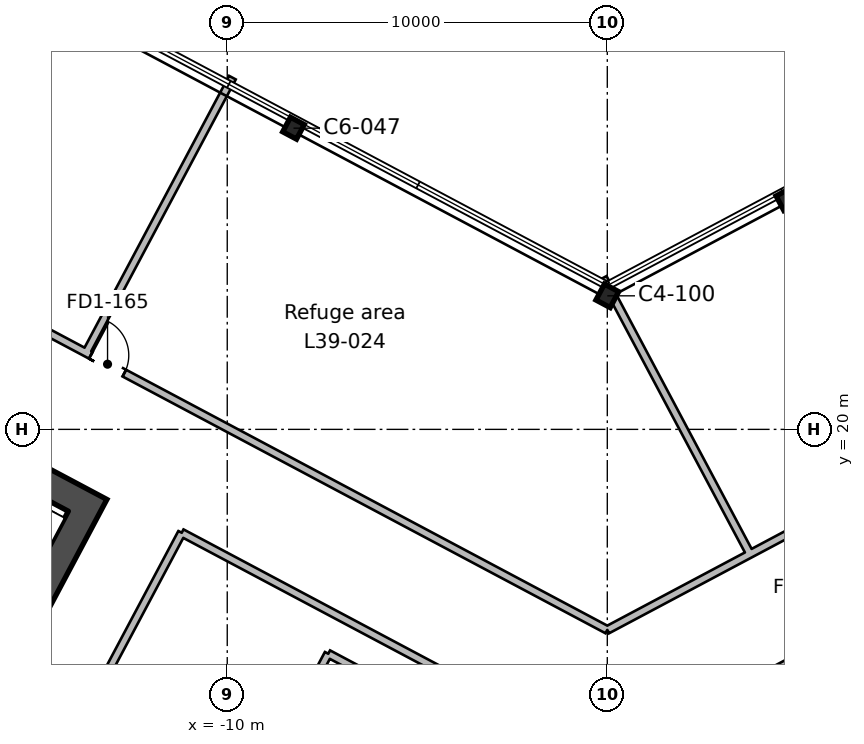
"""IFC4 building model, lengths in metres.
Left out: names, types, materials, properties, quantities, classifications, styles, units other than length and angle.
Written with IfcOpenShell. Run it as: python <this file> out.ifc"""

import sys

from ifc_helpers import new_model, si_unit, direction, frame, frame_2d, origin, origin_2d, place, context, subcontext, project, spatial, rectangle, i_section, extrude, element, fill, save


model = new_model("IFC4")
c1 = context("Model", 3, precision=1e-05, world=origin(), true_north=direction((0.0, 1.0)))
c2 = subcontext(c1, "Body", "Model", "MODEL_VIEW")
j1 = project(units=[si_unit("LENGTHUNIT", "METRE"), si_unit("PLANEANGLEUNIT", "RADIAN")], contexts=[c1])
p1 = place(None, origin())
s1 = spatial("IfcSite", under=j1, at=p1, CompositionType="ELEMENT")
p2 = place(p1, origin())
s2 = spatial("IfcBuilding", under=s1, at=p2, CompositionType="ELEMENT")
p3 = place(p2, frame((0.0, 0.0, 183.6)))
s3 = spatial("IfcBuildingStorey", under=s2, at=p3, CompositionType="ELEMENT", Elevation=183.6)
p4 = place(p3, frame((0.0, 23.514, 0.0), z_axis=(0.0, 0.0, 1.0), x_axis=(-0.882947592859, 0.469471562786, 0.0)))
e1 = element("IfcColumn", 1, at=p4, inside=s3, PredefinedType="COLUMN", context=c2, shape_type="SweptSolid", body=[
    extrude(i_section(OverallWidth=0.424, OverallDepth=0.475, WebThickness=0.048, FlangeThickness=0.077, FilletRadius=0.015, at=origin_2d()), origin(), (0.0, 0.0, 1.0), 6.0),
])
for number, where, z_axis, x_axis in (
    (2, (4.725, 26.047, 0.0), (0.0, 0.0, 1.0), (-0.883, -0.469, 0.0)),
    (3, (-8.257, 27.925, 0.0), (0.0, 0.0, 1.0), (-0.883, 0.469, 0.0)),
):
    element("IfcColumn", number, at=place(p3, frame(where, z_axis=z_axis, x_axis=x_axis)), inside=s3, PredefinedType="COLUMN", context=c2, shape_type="SweptSolid", body=[
        extrude(i_section(OverallWidth=0.412, OverallDepth=0.434, WebThickness=0.036, FlangeThickness=0.057, FilletRadius=0.015, at=origin_2d()), origin(), (0.0, 0.0, 1.0), 6.0),
    ])
p5 = place(p3, frame((-13.498, 18.333, 0.0), z_axis=(0.0, 0.0, 1.0), x_axis=(-0.469469918705, -0.88294846703, 0.0)))
e4 = element("IfcWall", 4, at=p5, inside=s3, PredefinedType="SHEAR", context=c2, shape_type="SweptSolid", body=[
    extrude(rectangle(XDim=19.7, YDim=0.75, at=frame_2d((9.85, 0.0))), origin(), (0.0, 0.0, 1.0), 6.0),
])
p6 = place(p5, frame((6.85, 0.0, 0.0)))
e5 = element("IfcOpeningElement", 5, at=p6, cuts=e4, PredefinedType="OPENING", context=c2, shape_type="SweptSolid", body=[
    extrude(rectangle(XDim=2.4, YDim=2.4, at=frame_2d((1.2, 1.2))), frame((0.0, 0.385, 0.0), z_axis=(0.0, -1.0, 0.0), x_axis=(1.0, 0.0, 0.0)), (0.0, 0.0, 1.0), 0.77),
])
p7 = place(p3, frame((-14.005, 18.178, 0.0), z_axis=(0.0, 0.0, 1.0), x_axis=(-0.88295010195, 0.469466843842, 0.0)))
e6 = element("IfcWall", 6, at=p7, inside=s3, PredefinedType="SHEAR", context=c2, shape_type="SweptSolid", body=[
    extrude(rectangle(XDim=20.2, YDim=0.75, at=frame_2d((10.1, 0.0))), origin(), (0.0, 0.0, 1.0), 6.0),
])
p8 = place(p3, frame((-47.73, 40.102, 0.0), z_axis=(0.0, 0.0, 1.0), x_axis=(0.882942458257, -0.469481219441, 0.0)))
e7 = element("IfcWall", 7, at=p8, inside=s3, PredefinedType="PARTITIONING", context=c2, shape_type="SweptSolid", body=[
    extrude(rectangle(XDim=54.058, YDim=0.2, at=frame_2d((27.029, 0.0))), origin(), (0.0, 0.0, 1.0), 5.55),
])
p9 = place(p8, frame((38.665, 0.0, 0.0)))
e8 = element("IfcOpeningElement", 8, at=p9, cuts=e7, PredefinedType="OPENING", context=c2, shape_type="SweptSolid", body=[
    extrude(rectangle(XDim=1.0, YDim=2.1, at=frame_2d((0.5, 1.05))), frame((0.0, 0.11, 0.0), z_axis=(0.0, -1.0, 0.0), x_axis=(1.0, 0.0, 0.0)), (0.0, 0.0, 1.0), 0.22),
])
p10 = place(p8, frame((26.766, 0.0, 0.0)))
e9 = element("IfcOpeningElement", 9, at=p10, cuts=e7, PredefinedType="OPENING", context=c2, shape_type="SweptSolid", body=[
    extrude(rectangle(XDim=1.0, YDim=2.1, at=frame_2d((0.5, 1.05))), frame((0.0, 0.11, 0.0), z_axis=(0.0, -1.0, 0.0), x_axis=(1.0, 0.0, 0.0)), (0.0, 0.0, 1.0), 0.22),
])
p11 = place(p8, frame((20.465, 0.0, 0.0)))
e10 = element("IfcOpeningElement", 10, at=p11, cuts=e7, PredefinedType="OPENING", context=c2, shape_type="SweptSolid", body=[
    extrude(rectangle(XDim=1.0, YDim=2.1, at=frame_2d((0.5, 1.05))), frame((0.0, 0.11, 0.0), z_axis=(0.0, -1.0, 0.0), x_axis=(1.0, 0.0, 0.0)), (0.0, 0.0, 1.0), 0.22),
])
p12 = place(p8, frame((14.866, 0.0, 0.0)))
e11 = element("IfcOpeningElement", 11, at=p12, cuts=e7, PredefinedType="OPENING", context=c2, shape_type="SweptSolid", body=[
    extrude(rectangle(XDim=1.0, YDim=2.1, at=frame_2d((0.5, 1.05))), frame((0.0, 0.11, 0.0), z_axis=(0.0, -1.0, 0.0), x_axis=(1.0, 0.0, 0.0)), (0.0, 0.0, 1.0), 0.22),
])
p13 = place(p3, frame((0.0, 14.723, 0.0), z_axis=(0.0, 0.0, 1.0), x_axis=(0.882950329887, 0.469466415149, 0.0)))
e12 = element("IfcWall", 12, at=p13, inside=s3, PredefinedType="PARTITIONING", context=c2, shape_type="SweptSolid", body=[
    extrude(rectangle(XDim=49.288, YDim=0.2, at=frame_2d((24.644, 0.0))), origin(), (0.0, 0.0, 1.0), 5.55),
])
p14 = place(p13, frame((23.95, 0.0, 0.0)))
e13 = element("IfcOpeningElement", 13, at=p14, cuts=e12, PredefinedType="OPENING", context=c2, shape_type="SweptSolid", body=[
    extrude(rectangle(XDim=1.0, YDim=2.1, at=frame_2d((0.5, 1.05))), frame((0.0, 0.11, 0.0), z_axis=(0.0, -1.0, 0.0), x_axis=(1.0, 0.0, 0.0)), (0.0, 0.0, 1.0), 0.22),
])
p15 = place(p13, frame((17.95, 0.0, 0.0)))
e14 = element("IfcOpeningElement", 14, at=p15, cuts=e12, PredefinedType="OPENING", context=c2, shape_type="SweptSolid", body=[
    extrude(rectangle(XDim=1.0, YDim=2.1, at=frame_2d((0.5, 1.05))), frame((0.0, 0.11, 0.0), z_axis=(0.0, -1.0, 0.0), x_axis=(1.0, 0.0, 0.0)), (0.0, 0.0, 1.0), 0.22),
])
p16 = place(p13, frame((13.55, 0.0, 0.0)))
e15 = element("IfcOpeningElement", 15, at=p16, cuts=e12, PredefinedType="OPENING", context=c2, shape_type="SweptSolid", body=[
    extrude(rectangle(XDim=1.0, YDim=2.1, at=frame_2d((0.5, 1.05))), frame((0.0, 0.11, 0.0), z_axis=(0.0, -1.0, 0.0), x_axis=(1.0, 0.0, 0.0)), (0.0, 0.0, 1.0), 0.22),
])
p17 = place(p3, frame((-9.864, 29.255, 0.0), z_axis=(0.0, 0.0, 1.0), x_axis=(-0.4695216236, -0.882920973231, 0.0)))
e16 = element("IfcWall", 16, at=p17, inside=s3, PredefinedType="PARTITIONING", context=c2, shape_type="SweptSolid", body=[
    extrude(rectangle(XDim=8.2, YDim=0.2, at=frame_2d((4.1, 0.0))), origin(), (0.0, 0.0, 1.0), 5.55),
])
p18 = place(p3, frame((-15.353, -0.97, 0.0), z_axis=(0.0, 0.0, 1.0), x_axis=(0.469461347352, 0.882953024426, 0.0)))
e17 = element("IfcWall", 17, at=p18, inside=s3, PredefinedType="PARTITIONING", context=c2, shape_type="SweptSolid", body=[
    extrude(rectangle(XDim=17.064, YDim=0.2, at=frame_2d((8.532, 0.0))), origin(), (0.0, 0.0, 1.0), 5.55),
])
p19 = place(p3, frame((-7.342, 14.097, 0.0), z_axis=(0.0, 0.0, 1.0), x_axis=(0.883005616924, -0.469362419118, 0.0)))
e18 = element("IfcWall", 18, at=p19, inside=s3, PredefinedType="PARTITIONING", context=c2, shape_type="SweptSolid", body=[
    extrude(rectangle(XDim=3.475, YDim=0.2, at=frame_2d((1.737, 0.0))), origin(), (0.0, 0.0, 1.0), 5.55),
])
p20 = place(p3, frame((-20.588, -0.379, 0.0), z_axis=(0.0, 0.0, 1.0), x_axis=(0.469489882812, 0.882937851685, 0.0)))
e19 = element("IfcWall", 19, at=p20, inside=s3, PredefinedType="PARTITIONING", context=c2, shape_type="SweptSolid", body=[
    extrude(rectangle(XDim=20.0, YDim=0.2, at=frame_2d((10.0, 0.0))), origin(), (0.0, 0.0, 1.0), 5.55),
])
p21 = place(p20, frame((9.55, 0.0, 0.0)))
e20 = element("IfcOpeningElement", 20, at=p21, cuts=e19, PredefinedType="OPENING", context=c2, shape_type="SweptSolid", body=[
    extrude(rectangle(XDim=1.0, YDim=2.1, at=frame_2d((0.5, 1.05))), frame((0.0, 0.11, 0.0), z_axis=(0.0, -1.0, 0.0), x_axis=(1.0, 0.0, 0.0)), (0.0, 0.0, 1.0), 0.22),
])
p22 = place(p3, frame((-11.198, 17.28, 0.0), z_axis=(0.0, 0.0, 1.0), x_axis=(0.882952451638, -0.469462424637, 0.0)))
e21 = element("IfcWall", 21, at=p22, inside=s3, PredefinedType="PARTITIONING", context=c2, shape_type="SweptSolid", body=[
    extrude(rectangle(XDim=9.064, YDim=0.2, at=frame_2d((4.532, 0.0))), origin(), (0.0, 0.0, 1.0), 5.55),
])
p23 = place(p3, frame((-0.108, 23.986, 0.0), z_axis=(0.0, 0.0, 1.0), x_axis=(0.469523920224, -0.882919751924, 0.0)))
e22 = element("IfcWall", 22, at=p23, inside=s3, PredefinedType="PARTITIONING", context=c2, shape_type="SweptSolid", body=[
    extrude(rectangle(XDim=8.23, YDim=0.2, at=frame_2d((4.115, 0.0))), origin(), (0.0, 0.0, 1.0), 5.55),
])
p24 = place(p3, frame((3.195, 13.025, 0.0), z_axis=(0.0, 0.0, 1.0), x_axis=(0.882993980878, 0.469384309211, 0.0)))
e23 = element("IfcWall", 23, at=p24, inside=s3, PredefinedType="PARTITIONING", context=c2, shape_type="SweptSolid", body=[
    extrude(rectangle(XDim=5.064, YDim=0.2, at=frame_2d((2.532, 0.0))), origin(), (0.0, 0.0, 1.0), 5.55),
])
p25 = place(p24, frame((2.05, 0.0, 0.0)))
e24 = element("IfcOpeningElement", 24, at=p25, cuts=e23, PredefinedType="OPENING", context=c2, shape_type="SweptSolid", body=[
    extrude(rectangle(XDim=1.0, YDim=2.1, at=frame_2d((0.5, 1.05))), frame((0.0, 0.11, 0.0), z_axis=(0.0, -1.0, 0.0), x_axis=(1.0, 0.0, 0.0)), (0.0, 0.0, 1.0), 0.22),
])
p26 = place(p9, origin())
e25 = element("IfcDoor", 25, at=p26, inside=s3, OperationType="SINGLE_SWING_LEFT", PredefinedType="DOOR", context=c2, shape_type="SweptSolid", body=[
    extrude(rectangle(XDim=1.0, YDim=2.1, at=frame_2d((0.5, 1.05))), frame((0.0, 0.025, 0.0), z_axis=(0.0, -1.0, 0.0), x_axis=(1.0, 0.0, 0.0)), (0.0, 0.0, 1.0), 0.05),
])
fill(e8, e25)
save(model, sys.argv[1])
